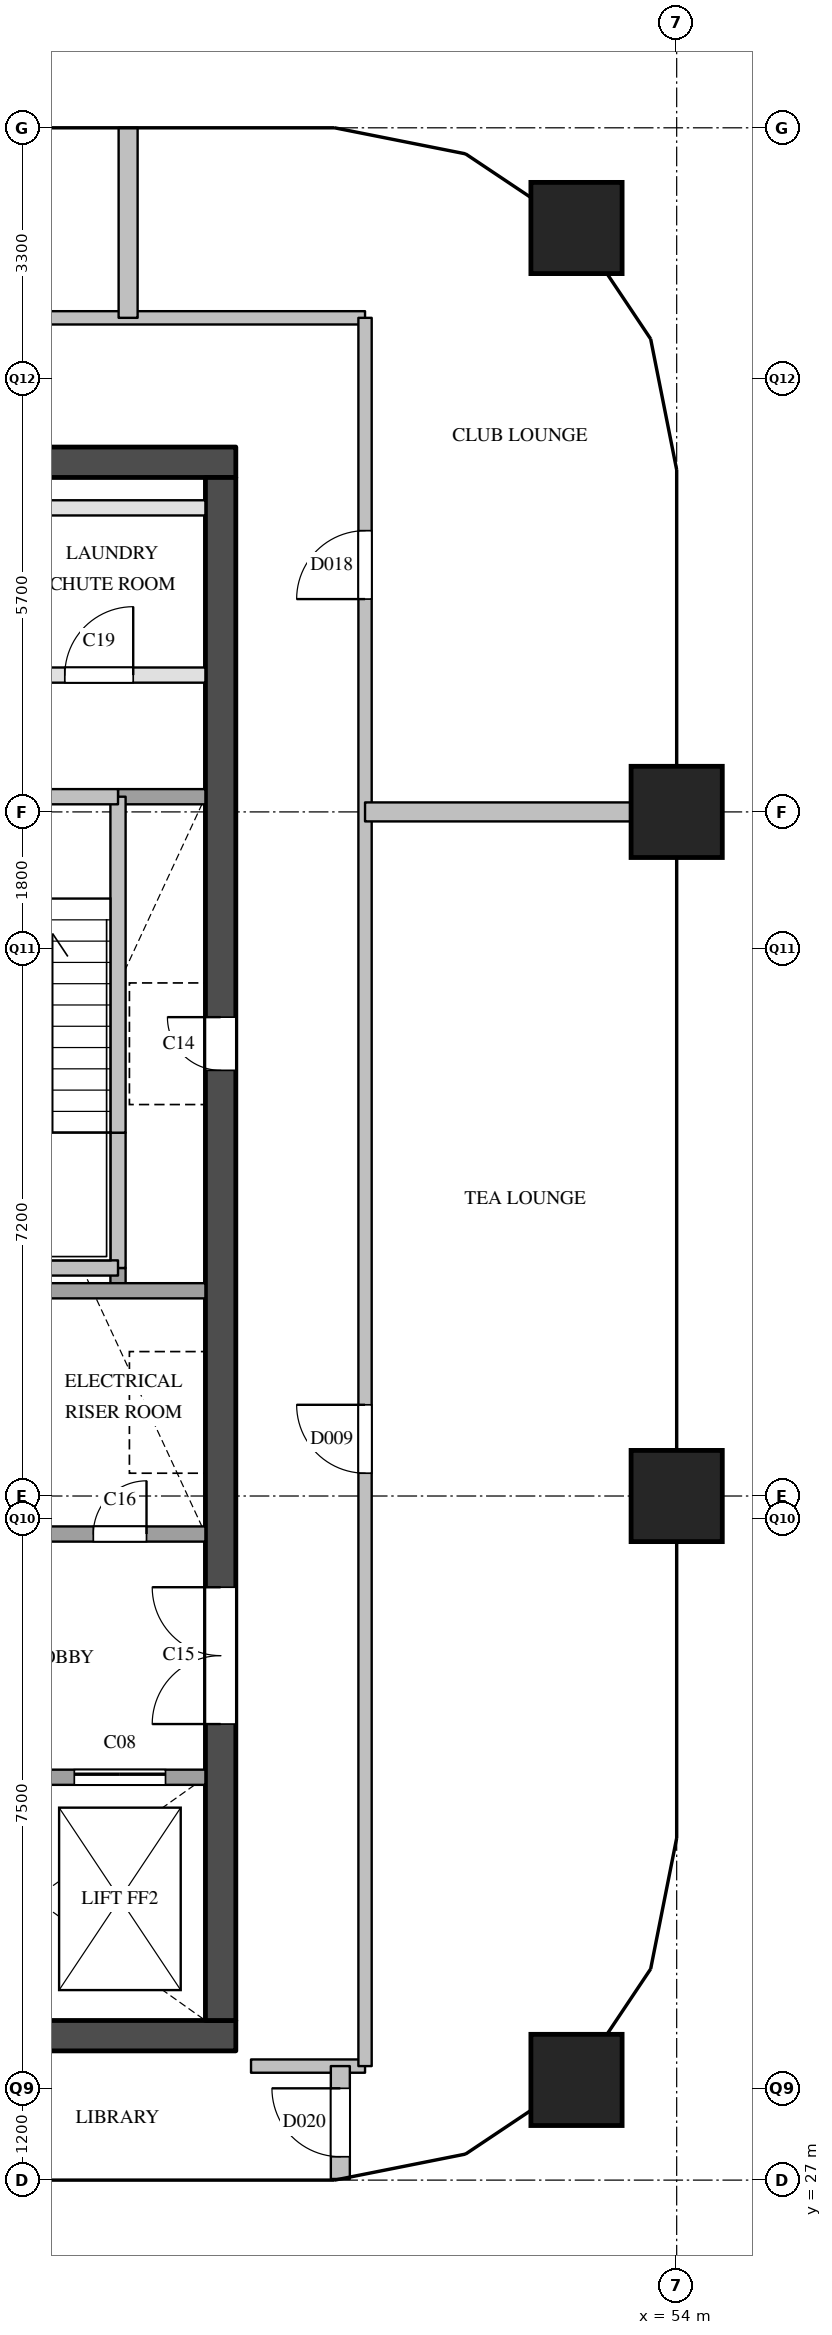
"""IFC4 building model, lengths in metres.
Left out: names, types, materials, properties, quantities, classifications, styles, units other than length and angle.
Written with IfcOpenShell. Run it as: python <this file> out.ifc"""

import sys

from ifc_helpers import new_model, si_unit, direction, frame, frame_2d, origin, origin_2d, place, context, subcontext, project, spatial, rectangle, extrude, element, fill, save


model = new_model("IFC4")
c1 = context("Model", 3, precision=1e-05, world=origin(), true_north=direction((0.0, 1.0)))
c2 = subcontext(c1, "Body", "Model", "MODEL_VIEW")
j1 = project(units=[si_unit("LENGTHUNIT", "METRE"), si_unit("PLANEANGLEUNIT", "RADIAN")], contexts=[c1])
p1 = place(None, origin())
s1 = spatial("IfcSite", under=j1, at=p1, CompositionType="ELEMENT")
p2 = place(p1, origin())
s2 = spatial("IfcBuilding", under=s1, at=p2, CompositionType="ELEMENT")
p3 = place(p2, frame((0.0, 0.0, 246.2)))
s3 = spatial("IfcBuildingStorey", under=s2, at=p3, CompositionType="ELEMENT", Elevation=246.2)
for number, where, z_axis, x_axis in (
    (1, (52.682, 28.318, 0.0), (0.0, 0.0, 1.0), (1.0, 0.0, 0.0)),
    (2, (54.0, 36.0, 0.0), (0.0, 0.0, 1.0), (1.0, 0.0, 0.0)),
    (3, (54.0, 45.0, 0.0), (0.0, 0.0, 1.0), (1.0, 0.0, 0.0)),
    (4, (52.682, 52.682, 0.0), (0.0, 0.0, 1.0), (1.0, 0.0, 0.0)),
):
    element("IfcColumn", number, at=place(p3, frame(where, z_axis=z_axis, x_axis=x_axis)), inside=s3, PredefinedType="COLUMN", context=c2, shape_type="SweptSolid", body=[
        extrude(rectangle(XDim=1.2, YDim=1.2, at=origin_2d()), origin(), (0.0, 0.0, 1.0), 3.9),
    ])
p4 = place(p3, frame((36.2, 28.9, 0.0), z_axis=(0.0, 0.0, 1.0), x_axis=(1.0, 0.0, 0.0)))
e5 = element("IfcWall", 5, at=p4, inside=s3, PredefinedType="SHEAR", context=c2, shape_type="SweptSolid", body=[
    extrude(rectangle(XDim=12.0, YDim=0.4, at=frame_2d((6.0, 0.0))), origin(), (0.0, 0.0, 1.0), 3.6),
])
p5 = place(p4, frame((0.85, 0.0, 0.0)))
e6 = element("IfcOpeningElement", 6, at=p5, cuts=e5, PredefinedType="OPENING", context=c2, shape_type="SweptSolid", body=[
    extrude(rectangle(XDim=1.2, YDim=2.1, at=frame_2d((0.6, 1.05))), frame((0.0, 0.21, 0.0), z_axis=(0.0, -1.0, 0.0), x_axis=(1.0, 0.0, 0.0)), (0.0, 0.0, 1.0), 0.42),
])
p6 = place(p4, frame((2.95, 0.0, 0.0)))
e7 = element("IfcOpeningElement", 7, at=p6, cuts=e5, PredefinedType="OPENING", context=c2, shape_type="SweptSolid", body=[
    extrude(rectangle(XDim=1.2, YDim=2.1, at=frame_2d((0.6, 1.05))), frame((0.0, 0.21, 0.0), z_axis=(0.0, -1.0, 0.0), x_axis=(1.0, 0.0, 0.0)), (0.0, 0.0, 1.0), 0.42),
])
p7 = place(p4, frame((5.05, 0.0, 0.0)))
e8 = element("IfcOpeningElement", 8, at=p7, cuts=e5, PredefinedType="OPENING", context=c2, shape_type="SweptSolid", body=[
    extrude(rectangle(XDim=1.2, YDim=2.1, at=frame_2d((0.6, 1.05))), frame((0.0, 0.21, 0.0), z_axis=(0.0, -1.0, 0.0), x_axis=(1.0, 0.0, 0.0)), (0.0, 0.0, 1.0), 0.42),
])
p8 = place(p3, frame((36.2, 49.6, 0.0), z_axis=(0.0, 0.0, 1.0), x_axis=(1.0, 0.0, 0.0)))
e9 = element("IfcWall", 9, at=p8, inside=s3, PredefinedType="SHEAR", context=c2, shape_type="SweptSolid", body=[
    extrude(rectangle(XDim=12.0, YDim=0.4, at=frame_2d((6.0, 0.0))), origin(), (0.0, 0.0, 1.0), 3.6),
])
p9 = place(p3, frame((48.0, 29.1, 0.0), z_axis=(0.0, 0.0, 1.0), x_axis=(0.0, 1.0, 0.0)))
e10 = element("IfcWall", 10, at=p9, inside=s3, PredefinedType="SHEAR", context=c2, shape_type="SweptSolid", body=[
    extrude(rectangle(XDim=20.3, YDim=0.4, at=frame_2d((10.15, 0.0))), origin(), (0.0, 0.0, 1.0), 3.6),
])
p10 = place(p9, frame((12.5, 0.0, 0.0)))
e11 = element("IfcOpeningElement", 11, at=p10, cuts=e10, PredefinedType="OPENING", context=c2, shape_type="SweptSolid", body=[
    extrude(rectangle(XDim=0.7, YDim=2.1, at=frame_2d((0.35, 1.05))), frame((0.0, 0.21, 0.0), z_axis=(0.0, -1.0, 0.0), x_axis=(1.0, 0.0, 0.0)), (0.0, 0.0, 1.0), 0.42),
])
p11 = place(p9, frame((3.9, 0.0, 0.0)))
e12 = element("IfcOpeningElement", 12, at=p11, cuts=e10, PredefinedType="OPENING", context=c2, shape_type="SweptSolid", body=[
    extrude(rectangle(XDim=1.8, YDim=2.1, at=frame_2d((0.9, 1.05))), frame((0.0, 0.21, 0.0), z_axis=(0.0, -1.0, 0.0), x_axis=(1.0, 0.0, 0.0)), (0.0, 0.0, 1.0), 0.42),
])
p12 = place(p3, frame((46.65, 38.7, 0.0), z_axis=(0.0, 0.0, 1.0), x_axis=(0.0, 1.0, 0.0)))
e13 = element("IfcWall", 13, at=p12, inside=s3, PredefinedType="SOLIDWALL", context=c2, shape_type="SweptSolid", body=[
    extrude(rectangle(XDim=0.3, YDim=0.2, at=frame_2d((0.15, 0.0))), origin(), (0.0, 0.0, 1.0), 3.6),
])
p13 = place(p3, frame((46.65, 39.0, 0.0), z_axis=(0.0, 0.0, 1.0), x_axis=(0.0, 1.0, 0.0)))
e14 = element("IfcWall", 14, at=p13, inside=s3, PredefinedType="SOLIDWALL", context=c2, shape_type="SweptSolid", body=[
    extrude(rectangle(XDim=1.78, YDim=0.2, at=frame_2d((0.89, 0.0))), origin(), (0.0, 0.0, 1.0), 3.6),
])
p14 = place(p3, frame((46.65, 40.78, 0.0), z_axis=(0.0, 0.0, 1.0), x_axis=(0.0, 1.0, 0.0)))
e15 = element("IfcWall", 15, at=p14, inside=s3, PredefinedType="SOLIDWALL", context=c2, shape_type="SweptSolid", body=[
    extrude(rectangle(XDim=4.42, YDim=0.2, at=frame_2d((2.21, 0.0))), origin(), (0.0, 0.0, 1.0), 3.6),
])
p15 = place(p3, frame((36.6, 32.3, 0.0), z_axis=(0.0, 0.0, 1.0), x_axis=(1.0, 0.0, 0.0)))
e16 = element("IfcWall", 16, at=p15, inside=s3, PredefinedType="SOLIDWALL", context=c2, shape_type="SweptSolid", body=[
    extrude(rectangle(XDim=11.2, YDim=0.2, at=frame_2d((5.6, 0.0))), origin(), (0.0, 0.0, 1.0), 3.6),
])
p16 = place(p15, frame((7.225, 0.0, 0.0)))
e17 = element("IfcOpeningElement", 17, at=p16, cuts=e16, PredefinedType="OPENING", context=c2, shape_type="SweptSolid", body=[
    extrude(rectangle(XDim=1.2, YDim=2.1, at=frame_2d((0.6, 1.05))), frame((0.0, 0.11, 0.0), z_axis=(0.0, -1.0, 0.0), x_axis=(1.0, 0.0, 0.0)), (0.0, 0.0, 1.0), 0.22),
])
p17 = place(p15, frame((9.475, 0.0, 0.0)))
e18 = element("IfcOpeningElement", 18, at=p17, cuts=e16, PredefinedType="OPENING", context=c2, shape_type="SweptSolid", body=[
    extrude(rectangle(XDim=1.2, YDim=2.1, at=frame_2d((0.6, 1.05))), frame((0.0, 0.11, 0.0), z_axis=(0.0, -1.0, 0.0), x_axis=(1.0, 0.0, 0.0)), (0.0, 0.0, 1.0), 0.22),
])
p18 = place(p3, frame((43.3, 35.5, 0.0), z_axis=(0.0, 0.0, 1.0), x_axis=(1.0, 0.0, 0.0)))
e19 = element("IfcWall", 19, at=p18, inside=s3, PredefinedType="SOLIDWALL", context=c2, shape_type="SweptSolid", body=[
    extrude(rectangle(XDim=4.5, YDim=0.2, at=frame_2d((2.25, 0.0))), origin(), (0.0, 0.0, 1.0), 3.6),
])
p19 = place(p18, frame((0.525, 0.0, 0.0)))
e20 = element("IfcOpeningElement", 20, at=p19, cuts=e19, PredefinedType="OPENING", context=c2, shape_type="SweptSolid", body=[
    extrude(rectangle(XDim=1.2, YDim=2.1, at=frame_2d((0.6, 1.05))), frame((0.0, 0.11, 0.0), z_axis=(0.0, -1.0, 0.0), x_axis=(1.0, 0.0, 0.0)), (0.0, 0.0, 1.0), 0.22),
])
p20 = place(p18, frame((3.025, 0.0, 0.0)))
e21 = element("IfcOpeningElement", 21, at=p20, cuts=e19, PredefinedType="OPENING", context=c2, shape_type="SweptSolid", body=[
    extrude(rectangle(XDim=0.7, YDim=2.1, at=frame_2d((0.35, 1.05))), frame((0.0, 0.11, 0.0), z_axis=(0.0, -1.0, 0.0), x_axis=(1.0, 0.0, 0.0)), (0.0, 0.0, 1.0), 0.22),
])
p21 = place(p3, frame((43.3, 38.7, 0.0), z_axis=(0.0, 0.0, 1.0), x_axis=(1.0, 0.0, 0.0)))
e22 = element("IfcWall", 22, at=p21, inside=s3, PredefinedType="SOLIDWALL", context=c2, shape_type="SweptSolid", body=[
    extrude(rectangle(XDim=4.5, YDim=0.2, at=frame_2d((2.25, 0.0))), origin(), (0.0, 0.0, 1.0), 3.6),
])
p22 = place(p3, frame((43.4, 39.0, 0.0), z_axis=(0.0, 0.0, 1.0), x_axis=(1.0, 0.0, 0.0)))
e23 = element("IfcWall", 23, at=p22, inside=s3, PredefinedType="SOLIDWALL", context=c2, shape_type="SweptSolid", body=[
    extrude(rectangle(XDim=3.25, YDim=0.2, at=frame_2d((1.625, 0.0))), origin(), (0.0, 0.0, 1.0), 3.6),
])
p23 = place(p3, frame((46.65, 45.2, 0.0), z_axis=(0.0, 0.0, 1.0), x_axis=(1.0, 0.0, 0.0)))
e24 = element("IfcWall", 24, at=p23, inside=s3, PredefinedType="SOLIDWALL", context=c2, shape_type="SweptSolid", body=[
    extrude(rectangle(XDim=1.15, YDim=0.2, at=frame_2d((0.575, 0.0))), origin(), (0.0, 0.0, 1.0), 3.6),
])
p24 = place(p3, frame((36.6, 45.2, 0.0), z_axis=(0.0, 0.0, 1.0), x_axis=(1.0, 0.0, 0.0)))
e25 = element("IfcWall", 25, at=p24, inside=s3, PredefinedType="SOLIDWALL", context=c2, shape_type="SweptSolid", body=[
    extrude(rectangle(XDim=10.05, YDim=0.2, at=frame_2d((5.025, 0.0))), origin(), (0.0, 0.0, 1.0), 3.6),
])
p25 = place(p24, frame((1.125, 0.0, 0.0)))
e26 = element("IfcOpeningElement", 26, at=p25, cuts=e25, PredefinedType="OPENING", context=c2, shape_type="SweptSolid", body=[
    extrude(rectangle(XDim=1.1, YDim=2.1, at=frame_2d((0.55, 1.05))), frame((0.0, 0.11, 0.0), z_axis=(0.0, -1.0, 0.0), x_axis=(1.0, 0.0, 0.0)), (0.0, 0.0, 1.0), 0.22),
])
p26 = place(p24, frame((4.475, 0.0, 0.0)))
e27 = element("IfcOpeningElement", 27, at=p26, cuts=e25, PredefinedType="OPENING", context=c2, shape_type="SweptSolid", body=[
    extrude(rectangle(XDim=1.1, YDim=2.1, at=frame_2d((0.55, 1.05))), frame((0.0, 0.11, 0.0), z_axis=(0.0, -1.0, 0.0), x_axis=(1.0, 0.0, 0.0)), (0.0, 0.0, 1.0), 0.22),
])
p27 = place(p24, frame((7.825, 0.0, 0.0)))
e28 = element("IfcOpeningElement", 28, at=p27, cuts=e25, PredefinedType="OPENING", context=c2, shape_type="SweptSolid", body=[
    extrude(rectangle(XDim=1.1, YDim=2.1, at=frame_2d((0.55, 1.05))), frame((0.0, 0.11, 0.0), z_axis=(0.0, -1.0, 0.0), x_axis=(1.0, 0.0, 0.0)), (0.0, 0.0, 1.0), 0.22),
])
p28 = place(p3, frame((36.6, 46.8, 0.0), z_axis=(0.0, 0.0, 1.0), x_axis=(1.0, 0.0, 0.0)))
e29 = element("IfcWall", 29, at=p28, inside=s3, PredefinedType="PARTITIONING", context=c2, shape_type="SweptSolid", body=[
    extrude(rectangle(XDim=11.2, YDim=0.2, at=frame_2d((5.6, 0.0))), origin(), (0.0, 0.0, 1.0), 3.6),
])
p29 = place(p28, frame((3.75, 0.0, 0.0)))
e30 = element("IfcOpeningElement", 30, at=p29, cuts=e29, PredefinedType="OPENING", context=c2, shape_type="SweptSolid", body=[
    extrude(rectangle(XDim=0.9, YDim=2.1, at=frame_2d((0.45, 1.05))), frame((0.0, 0.11, 0.0), z_axis=(0.0, -1.0, 0.0), x_axis=(1.0, 0.0, 0.0)), (0.0, 0.0, 1.0), 0.22),
])
p30 = place(p28, frame((9.35, 0.0, 0.0)))
e31 = element("IfcOpeningElement", 31, at=p30, cuts=e29, PredefinedType="OPENING", context=c2, shape_type="SweptSolid", body=[
    extrude(rectangle(XDim=0.9, YDim=2.1, at=frame_2d((0.45, 1.05))), frame((0.0, 0.11, 0.0), z_axis=(0.0, -1.0, 0.0), x_axis=(1.0, 0.0, 0.0)), (0.0, 0.0, 1.0), 0.22),
])
p31 = place(p3, frame((36.6, 49.0, 0.0), z_axis=(0.0, 0.0, 1.0), x_axis=(1.0, 0.0, 0.0)))
e32 = element("IfcWall", 32, at=p31, inside=s3, PredefinedType="PARTITIONING", context=c2, shape_type="SweptSolid", body=[
    extrude(rectangle(XDim=11.2, YDim=0.2, at=frame_2d((5.6, 0.0))), origin(), (0.0, 0.0, 1.0), 3.6),
])
p32 = place(p3, frame((48.4, 28.5, 0.0), z_axis=(0.0, 0.0, 1.0), x_axis=(1.0, 0.0, 0.0)))
e33 = element("IfcWall", 33, at=p32, inside=s3, PredefinedType="PARTITIONING", context=c2, shape_type="SweptSolid", body=[
    extrude(rectangle(XDim=1.5, YDim=0.175, at=frame_2d((0.75, 0.0))), origin(), (0.0, 0.0, 1.0), 3.6),
])
p33 = place(p3, frame((34.5, 51.5, 0.0), z_axis=(0.0, 0.0, 1.0), x_axis=(1.0, 0.0, 0.0)))
e34 = element("IfcWall", 34, at=p33, inside=s3, PredefinedType="PARTITIONING", context=c2, shape_type="SweptSolid", body=[
    extrude(rectangle(XDim=15.4, YDim=0.175, at=frame_2d((7.7, 0.0))), origin(), (0.0, 0.0, 1.0), 3.6),
])
p34 = place(p33, frame((5.892, 0.0, 0.0)))
e35 = element("IfcOpeningElement", 35, at=p34, cuts=e34, PredefinedType="OPENING", context=c2, shape_type="SweptSolid", body=[
    extrude(rectangle(XDim=1.0, YDim=2.1, at=frame_2d((0.5, 1.05))), frame((0.0, 0.097, 0.0), z_axis=(0.0, -1.0, 0.0), x_axis=(1.0, 0.0, 0.0)), (0.0, 0.0, 1.0), 0.195),
])
p35 = place(p3, frame((49.9, 28.5, 0.0), z_axis=(0.0, 0.0, 1.0), x_axis=(0.0, 1.0, 0.0)))
e36 = element("IfcWall", 36, at=p35, inside=s3, PredefinedType="PARTITIONING", context=c2, shape_type="SweptSolid", body=[
    extrude(rectangle(XDim=23.0, YDim=0.175, at=frame_2d((11.5, 0.0))), origin(), (0.0, 0.0, 1.0), 3.6),
])
p36 = place(p35, frame((7.8, 0.0, 0.0)))
e37 = element("IfcOpeningElement", 37, at=p36, cuts=e36, PredefinedType="OPENING", context=c2, shape_type="SweptSolid", body=[
    extrude(rectangle(XDim=0.9, YDim=2.1, at=frame_2d((0.45, 1.05))), frame((0.0, 0.097, 0.0), z_axis=(0.0, -1.0, 0.0), x_axis=(1.0, 0.0, 0.0)), (0.0, 0.0, 1.0), 0.195),
])
p37 = place(p35, frame((19.3, 0.0, 0.0)))
e38 = element("IfcOpeningElement", 38, at=p37, cuts=e36, PredefinedType="OPENING", context=c2, shape_type="SweptSolid", body=[
    extrude(rectangle(XDim=0.9, YDim=2.1, at=frame_2d((0.45, 1.05))), frame((0.0, 0.097, 0.0), z_axis=(0.0, -1.0, 0.0), x_axis=(1.0, 0.0, 0.0)), (0.0, 0.0, 1.0), 0.195),
])
p38 = place(p3, frame((49.9, 45.0, 0.0), z_axis=(0.0, 0.0, 1.0), x_axis=(1.0, 0.0, 0.0)))
e39 = element("IfcWall", 39, at=p38, inside=s3, PredefinedType="PARTITIONING", context=c2, shape_type="SweptSolid", body=[
    extrude(rectangle(XDim=4.1, YDim=0.25, at=frame_2d((2.05, 0.0))), origin(), (0.0, 0.0, 1.0), 3.6),
])
p39 = place(p3, frame((46.783, 51.5, 0.0), z_axis=(0.0, 0.0, 1.0), x_axis=(0.0, 1.0, 0.0)))
e40 = element("IfcWall", 40, at=p39, inside=s3, PredefinedType="PARTITIONING", context=c2, shape_type="SweptSolid", body=[
    extrude(rectangle(XDim=2.5, YDim=0.25, at=frame_2d((1.25, 0.0))), origin(), (0.0, 0.0, 1.0), 2.6),
])
p40 = place(p3, frame((49.575, 27.015, 0.0), z_axis=(0.0, 0.0, 1.0), x_axis=(0.0, 1.0, 0.0)))
e41 = element("IfcWall", 41, at=p40, inside=s3, PredefinedType="PARTITIONING", context=c2, shape_type="SweptSolid", body=[
    extrude(rectangle(XDim=1.485, YDim=0.25, at=frame_2d((0.743, 0.0))), origin(), (0.0, 0.0, 1.0), 2.6),
])
p41 = place(p40, frame((0.292, 0.0, 0.0)))
e42 = element("IfcOpeningElement", 42, at=p41, cuts=e41, PredefinedType="OPENING", context=c2, shape_type="SweptSolid", body=[
    extrude(rectangle(XDim=0.9, YDim=2.1, at=frame_2d((0.45, 1.05))), frame((0.0, 0.135, 0.0), z_axis=(0.0, -1.0, 0.0), x_axis=(1.0, 0.0, 0.0)), (0.0, 0.0, 1.0), 0.27),
])
p42 = place(p17, origin())
e43 = element("IfcDoor", 43, at=p42, inside=s3, OperationType="SLIDING_TO_LEFT", PredefinedType="DOOR", context=c2, shape_type="SweptSolid", body=[
    extrude(rectangle(XDim=1.2, YDim=2.1, at=frame_2d((0.6, 1.05))), frame((0.0, 0.025, 0.0), z_axis=(0.0, -1.0, 0.0), x_axis=(1.0, 0.0, 0.0)), (0.0, 0.0, 1.0), 0.05),
])
fill(e18, e43)
p43 = place(p10, origin())
e44 = element("IfcDoor", 44, at=p43, inside=s3, OperationType="SINGLE_SWING_RIGHT", PredefinedType="DOOR", context=c2, shape_type="SweptSolid", body=[
    extrude(rectangle(XDim=0.7, YDim=2.1, at=frame_2d((0.35, 1.05))), frame((0.0, 0.025, 0.0), z_axis=(0.0, -1.0, 0.0), x_axis=(1.0, 0.0, 0.0)), (0.0, 0.0, 1.0), 0.05),
])
fill(e11, e44)
p44 = place(p11, origin())
e45 = element("IfcDoor", 45, at=p44, inside=s3, OperationType="DOUBLE_DOOR_SINGLE_SWING", PredefinedType="DOOR", context=c2, shape_type="SweptSolid", body=[
    extrude(rectangle(XDim=1.8, YDim=2.1, at=frame_2d((0.9, 1.05))), frame((0.0, 0.025, 0.0), z_axis=(0.0, -1.0, 0.0), x_axis=(1.0, 0.0, 0.0)), (0.0, 0.0, 1.0), 0.05),
])
fill(e12, e45)
p45 = place(p20, origin())
e46 = element("IfcDoor", 46, at=p45, inside=s3, OperationType="SINGLE_SWING_RIGHT", PredefinedType="DOOR", context=c2, shape_type="SweptSolid", body=[
    extrude(rectangle(XDim=0.7, YDim=2.1, at=frame_2d((0.35, 1.05))), frame((0.0, 0.025, 0.0), z_axis=(0.0, -1.0, 0.0), x_axis=(1.0, 0.0, 0.0)), (0.0, 0.0, 1.0), 0.05),
])
fill(e21, e46)
p46 = place(p30, origin())
e47 = element("IfcDoor", 47, at=p46, inside=s3, OperationType="SINGLE_SWING_RIGHT", PredefinedType="DOOR", context=c2, shape_type="SweptSolid", body=[
    extrude(rectangle(XDim=0.9, YDim=2.1, at=frame_2d((0.45, 1.05))), frame((0.0, 0.025, 0.0), z_axis=(0.0, -1.0, 0.0), x_axis=(1.0, 0.0, 0.0)), (0.0, 0.0, 1.0), 0.05),
])
fill(e31, e47)
p47 = place(p36, origin())
e48 = element("IfcDoor", 48, at=p47, inside=s3, OperationType="SINGLE_SWING_RIGHT", PredefinedType="DOOR", context=c2, shape_type="SweptSolid", body=[
    extrude(rectangle(XDim=0.9, YDim=2.1, at=frame_2d((0.45, 1.05))), frame((0.0, 0.025, 0.0), z_axis=(0.0, -1.0, 0.0), x_axis=(1.0, 0.0, 0.0)), (0.0, 0.0, 1.0), 0.05),
])
fill(e37, e48)
p48 = place(p37, origin())
e49 = element("IfcDoor", 49, at=p48, inside=s3, OperationType="SINGLE_SWING_LEFT", PredefinedType="DOOR", context=c2, shape_type="SweptSolid", body=[
    extrude(rectangle(XDim=0.9, YDim=2.1, at=frame_2d((0.45, 1.05))), frame((0.0, 0.025, 0.0), z_axis=(0.0, -1.0, 0.0), x_axis=(1.0, 0.0, 0.0)), (0.0, 0.0, 1.0), 0.05),
])
fill(e38, e49)
p49 = place(p41, origin())
e50 = element("IfcDoor", 50, at=p49, inside=s3, OperationType="SINGLE_SWING_RIGHT", PredefinedType="DOOR", context=c2, shape_type="SweptSolid", body=[
    extrude(rectangle(XDim=0.9, YDim=2.1, at=frame_2d((0.45, 1.05))), frame((0.0, 0.025, 0.0), z_axis=(0.0, -1.0, 0.0), x_axis=(1.0, 0.0, 0.0)), (0.0, 0.0, 1.0), 0.05),
])
fill(e42, e50)
save(model, sys.argv[1])
